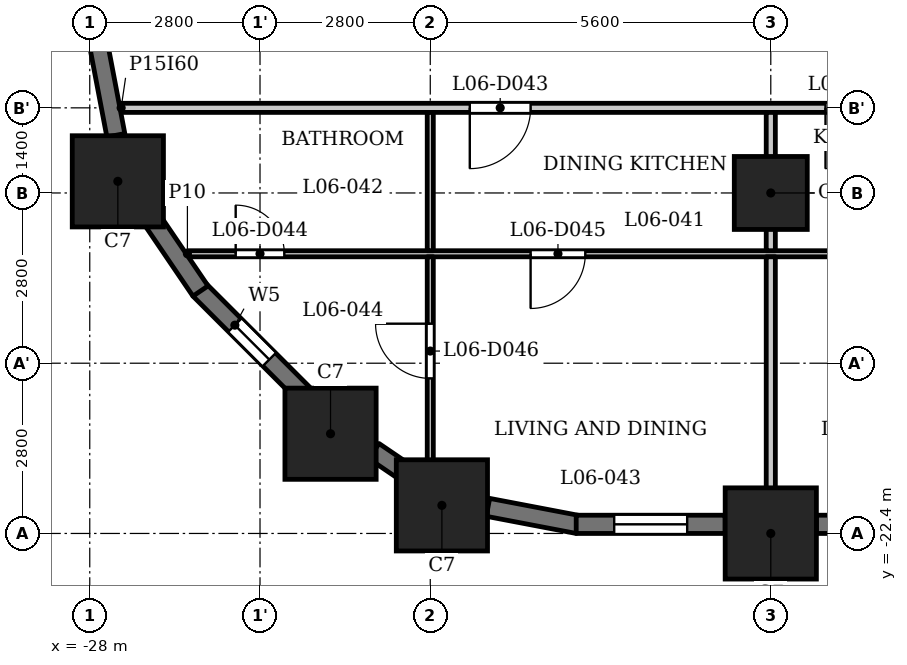
"""IFC4 building model, lengths in metres.
Left out: names, types, materials, properties, quantities, classifications, styles, units other than length and angle.
Written with IfcOpenShell. Run it as: python <this file> out.ifc"""

import sys

from ifc_helpers import new_model, si_unit, direction, frame, frame_2d, origin, origin_2d, place, context, subcontext, project, spatial, rectangle, extrude, element, fill, save


model = new_model("IFC4")
c1 = context("Model", 3, precision=1e-05, world=origin(), true_north=direction((0.0, 1.0)))
c2 = subcontext(c1, "Body", "Model", "MODEL_VIEW")
j1 = project(units=[si_unit("LENGTHUNIT", "METRE"), si_unit("PLANEANGLEUNIT", "RADIAN")], contexts=[c1])
p1 = place(None, origin())
s1 = spatial("IfcSite", under=j1, at=p1, CompositionType="ELEMENT")
p2 = place(p1, origin())
s2 = spatial("IfcBuilding", under=s1, at=p2, CompositionType="ELEMENT")
p3 = place(p2, frame((0.0, 0.0, 30.5)))
s3 = spatial("IfcBuildingStorey", under=s2, at=p3, CompositionType="ELEMENT", Elevation=30.5)
for number, where, z_axis, x_axis in (
    (1, (-22.209, -21.938, 0.0), (0.0, 0.0, 1.0), (1.0, 0.0, 0.0)),
    (2, (-16.8, -22.4, 0.0), (0.0, 0.0, 1.0), (1.0, 0.0, 0.0)),
    (3, (-27.538, -16.609, 0.0), (0.0, 0.0, 1.0), (1.0, 0.0, 0.0)),
    (4, (-24.04, -20.76, 0.0), (0.0, 0.0, 1.0), (1.0, 0.0, 0.0)),
):
    element("IfcColumn", number, at=place(p3, frame(where, z_axis=z_axis, x_axis=x_axis)), inside=s3, PredefinedType="COLUMN", context=c2, shape_type="SweptSolid", body=[
        extrude(rectangle(XDim=1.5, YDim=1.5, at=origin_2d()), origin(), (0.0, 0.0, 1.0), 3.5),
    ])
p4 = place(p3, frame((-16.8, -16.8, 0.0), z_axis=(0.0, 0.0, 1.0), x_axis=(1.0, 0.0, 0.0)))
e5 = element("IfcColumn", 5, at=p4, inside=s3, PredefinedType="COLUMN", context=c2, shape_type="SweptSolid", body=[
    extrude(rectangle(XDim=1.2, YDim=1.2, at=origin_2d()), origin(), (0.0, 0.0, 1.0), 3.5),
])
p5 = place(p3, frame((-26.197, -18.391, 0.0), z_axis=(0.0, 0.0, 1.0), x_axis=(0.707106781187, -0.707106781187, 0.0)))
e6 = element("IfcWall", 6, at=p5, inside=s3, PredefinedType="SOLIDWALL", context=c2, shape_type="SweptSolid", body=[
    extrude(rectangle(XDim=2.45, YDim=0.3, at=frame_2d((1.225, 0.0))), origin(), (0.0, 0.0, 1.0), 2.35),
])
p6 = place(p5, frame((0.825, 0.0, 0.6)))
e7 = element("IfcOpeningElement", 7, at=p6, cuts=e6, PredefinedType="OPENING", context=c2, shape_type="SweptSolid", body=[
    extrude(rectangle(XDim=0.8, YDim=1.55, at=frame_2d((0.4, 0.775))), frame((0.0, 0.16, 0.0), z_axis=(0.0, -1.0, 0.0), x_axis=(1.0, 0.0, 0.0)), (0.0, 0.0, 1.0), 0.32),
])
p7 = place(p3, frame((-23.327, -21.045, 0.0), z_axis=(0.0, 0.0, 1.0), x_axis=(0.827080706709, -0.562083182981, 0.0)))
e8 = element("IfcWall", 8, at=p7, inside=s3, PredefinedType="SOLIDWALL", context=c2, shape_type="SweptSolid", body=[
    extrude(rectangle(XDim=0.677, YDim=0.3, at=frame_2d((0.339, 0.0))), origin(), (0.0, 0.0, 1.0), 3.2),
])
p8 = place(p3, frame((-21.451, -21.97, 0.0), z_axis=(0.0, 0.0, 1.0), x_axis=(0.982287454367, -0.187380247071, 0.0)))
e9 = element("IfcWall", 9, at=p8, inside=s3, PredefinedType="SOLIDWALL", context=c2, shape_type="SweptSolid", body=[
    extrude(rectangle(XDim=1.506, YDim=0.3, at=frame_2d((0.753, 0.0))), origin(), (0.0, 0.0, 1.0), 2.35),
])
p9 = place(p3, frame((-20.0, -22.25, 0.0), z_axis=(0.0, 0.0, 1.0), x_axis=(1.0, 0.0, 0.0)))
e10 = element("IfcWall", 10, at=p9, inside=s3, PredefinedType="SOLIDWALL", context=c2, shape_type="SweptSolid", body=[
    extrude(rectangle(XDim=2.45, YDim=0.3, at=frame_2d((1.225, 0.0))), origin(), (0.0, 0.0, 1.0), 2.35),
])
p10 = place(p9, frame((0.625, 0.0, 0.6)))
e11 = element("IfcOpeningElement", 11, at=p10, cuts=e10, PredefinedType="OPENING", context=c2, shape_type="SweptSolid", body=[
    extrude(rectangle(XDim=1.2, YDim=1.55, at=frame_2d((0.6, 0.775))), frame((0.0, 0.16, 0.0), z_axis=(0.0, -1.0, 0.0), x_axis=(1.0, 0.0, 0.0)), (0.0, 0.0, 1.0), 0.32),
])
p11 = place(p3, frame((-16.05, -22.25, 0.0), z_axis=(0.0, 0.0, 1.0), x_axis=(1.0, 0.0, 0.0)))
e12 = element("IfcWall", 12, at=p11, inside=s3, PredefinedType="SOLIDWALL", context=c2, shape_type="SweptSolid", body=[
    extrude(rectangle(XDim=4.1, YDim=0.3, at=frame_2d((2.05, 0.0))), origin(), (0.0, 0.0, 1.0), 2.35),
])
p12 = place(p11, frame((0.25, 0.0, 1.2)))
e13 = element("IfcOpeningElement", 13, at=p12, cuts=e12, PredefinedType="OPENING", context=c2, shape_type="SweptSolid", body=[
    extrude(rectangle(XDim=3.6, YDim=0.95, at=frame_2d((1.8, 0.475))), frame((0.0, 0.16, 0.0), z_axis=(0.0, -1.0, 0.0), x_axis=(1.0, 0.0, 0.0)), (0.0, 0.0, 1.0), 0.32),
])
for number, where, z_axis, x_axis in (
    (14, (-27.853, -14.372, 0.0), (0.0, 0.0, 1.0), (0.187, -0.982, 0.0)),
    (15, (-27.025, -17.167, 0.0), (0.0, 0.0, 1.0), (0.562, -0.827, 0.0)),
):
    element("IfcWall", number, at=place(p3, frame(where, z_axis=z_axis, x_axis=x_axis)), inside=s3, PredefinedType="SOLIDWALL", context=c2, shape_type="SweptSolid", body=[
        extrude(rectangle(XDim=1.506, YDim=0.3, at=frame_2d((0.753, 0.0))), origin(), (0.0, 0.0, 1.0), 2.35),
    ])
p13 = place(p3, frame((-26.394, -17.8, 0.0), z_axis=(0.0, 0.0, 1.0), x_axis=(1.0, 0.0, 0.0)))
e16 = element("IfcWall", 16, at=p13, inside=s3, PredefinedType="PARTITIONING", context=c2, shape_type="SweptSolid", body=[
    extrude(rectangle(XDim=53.126, YDim=0.1, at=frame_2d((26.563, 0.0))), origin(), (0.0, 0.0, 1.0), 3.2),
])
p14 = place(p13, frame((0.794, 0.0, 0.0)))
e17 = element("IfcOpeningElement", 17, at=p14, cuts=e16, PredefinedType="OPENING", context=c2, shape_type="SweptSolid", body=[
    extrude(rectangle(XDim=0.8, YDim=2.1, at=frame_2d((0.4, 1.05))), frame((0.0, 0.06, 0.0), z_axis=(0.0, -1.0, 0.0), x_axis=(1.0, 0.0, 0.0)), (0.0, 0.0, 1.0), 0.12),
])
p15 = place(p13, frame((5.644, 0.0, 0.0)))
e18 = element("IfcOpeningElement", 18, at=p15, cuts=e16, PredefinedType="OPENING", context=c2, shape_type="SweptSolid", body=[
    extrude(rectangle(XDim=0.9, YDim=2.1, at=frame_2d((0.45, 1.05))), frame((0.0, 0.06, 0.0), z_axis=(0.0, -1.0, 0.0), x_axis=(1.0, 0.0, 0.0)), (0.0, 0.0, 1.0), 0.12),
])
p16 = place(p13, frame((13.244, 0.0, 0.0)))
e19 = element("IfcOpeningElement", 19, at=p16, cuts=e16, PredefinedType="OPENING", context=c2, shape_type="SweptSolid", body=[
    extrude(rectangle(XDim=0.8, YDim=2.1, at=frame_2d((0.4, 1.05))), frame((0.0, 0.06, 0.0), z_axis=(0.0, -1.0, 0.0), x_axis=(1.0, 0.0, 0.0)), (0.0, 0.0, 1.0), 0.12),
])
p17 = place(p13, frame((11.494, 0.0, 0.0)))
e20 = element("IfcOpeningElement", 20, at=p17, cuts=e16, PredefinedType="OPENING", context=c2, shape_type="SweptSolid", body=[
    extrude(rectangle(XDim=0.9, YDim=2.1, at=frame_2d((0.45, 1.05))), frame((0.0, 0.06, 0.0), z_axis=(0.0, -1.0, 0.0), x_axis=(1.0, 0.0, 0.0)), (0.0, 0.0, 1.0), 0.12),
])
p18 = place(p13, frame((19.344, 0.0, 0.0)))
e21 = element("IfcOpeningElement", 21, at=p18, cuts=e16, PredefinedType="OPENING", context=c2, shape_type="SweptSolid", body=[
    extrude(rectangle(XDim=0.8, YDim=2.1, at=frame_2d((0.4, 1.05))), frame((0.0, 0.06, 0.0), z_axis=(0.0, -1.0, 0.0), x_axis=(1.0, 0.0, 0.0)), (0.0, 0.0, 1.0), 0.12),
])
p19 = place(p13, frame((16.094, 0.0, 0.0)))
e22 = element("IfcOpeningElement", 22, at=p19, cuts=e16, PredefinedType="OPENING", context=c2, shape_type="SweptSolid", body=[
    extrude(rectangle(XDim=0.9, YDim=2.1, at=frame_2d((0.45, 1.05))), frame((0.0, 0.06, 0.0), z_axis=(0.0, -1.0, 0.0), x_axis=(1.0, 0.0, 0.0)), (0.0, 0.0, 1.0), 0.12),
])
p20 = place(p13, frame((24.944, 0.0, 0.0)))
e23 = element("IfcOpeningElement", 23, at=p20, cuts=e16, PredefinedType="OPENING", context=c2, shape_type="SweptSolid", body=[
    extrude(rectangle(XDim=0.8, YDim=2.1, at=frame_2d((0.4, 1.05))), frame((0.0, 0.06, 0.0), z_axis=(0.0, -1.0, 0.0), x_axis=(1.0, 0.0, 0.0)), (0.0, 0.0, 1.0), 0.12),
])
p21 = place(p13, frame((22.444, 0.0, 0.0)))
e24 = element("IfcOpeningElement", 24, at=p21, cuts=e16, PredefinedType="OPENING", context=c2, shape_type="SweptSolid", body=[
    extrude(rectangle(XDim=0.9, YDim=2.1, at=frame_2d((0.45, 1.05))), frame((0.0, 0.06, 0.0), z_axis=(0.0, -1.0, 0.0), x_axis=(1.0, 0.0, 0.0)), (0.0, 0.0, 1.0), 0.12),
])
p22 = place(p13, frame((30.294, 0.0, 0.0)))
e25 = element("IfcOpeningElement", 25, at=p22, cuts=e16, PredefinedType="OPENING", context=c2, shape_type="SweptSolid", body=[
    extrude(rectangle(XDim=0.8, YDim=2.1, at=frame_2d((0.4, 1.05))), frame((0.0, 0.06, 0.0), z_axis=(0.0, -1.0, 0.0), x_axis=(1.0, 0.0, 0.0)), (0.0, 0.0, 1.0), 0.12),
])
p23 = place(p13, frame((26.794, 0.0, 0.0)))
e26 = element("IfcOpeningElement", 26, at=p23, cuts=e16, PredefinedType="OPENING", context=c2, shape_type="SweptSolid", body=[
    extrude(rectangle(XDim=0.9, YDim=2.1, at=frame_2d((0.45, 1.05))), frame((0.0, 0.06, 0.0), z_axis=(0.0, -1.0, 0.0), x_axis=(1.0, 0.0, 0.0)), (0.0, 0.0, 1.0), 0.12),
])
p24 = place(p13, frame((32.744, 0.0, 0.0)))
e27 = element("IfcOpeningElement", 27, at=p24, cuts=e16, PredefinedType="OPENING", context=c2, shape_type="SweptSolid", body=[
    extrude(rectangle(XDim=0.8, YDim=2.1, at=frame_2d((0.4, 1.05))), frame((0.0, 0.06, 0.0), z_axis=(0.0, -1.0, 0.0), x_axis=(1.0, 0.0, 0.0)), (0.0, 0.0, 1.0), 0.12),
])
p25 = place(p13, frame((35.594, 0.0, 0.0)))
e28 = element("IfcOpeningElement", 28, at=p25, cuts=e16, PredefinedType="OPENING", context=c2, shape_type="SweptSolid", body=[
    extrude(rectangle(XDim=0.9, YDim=2.1, at=frame_2d((0.45, 1.05))), frame((0.0, 0.06, 0.0), z_axis=(0.0, -1.0, 0.0), x_axis=(1.0, 0.0, 0.0)), (0.0, 0.0, 1.0), 0.12),
])
p26 = place(p13, frame((39.244, 0.0, 0.0)))
e29 = element("IfcOpeningElement", 29, at=p26, cuts=e16, PredefinedType="OPENING", context=c2, shape_type="SweptSolid", body=[
    extrude(rectangle(XDim=0.9, YDim=2.1, at=frame_2d((0.45, 1.05))), frame((0.0, 0.06, 0.0), z_axis=(0.0, -1.0, 0.0), x_axis=(1.0, 0.0, 0.0)), (0.0, 0.0, 1.0), 0.12),
])
p27 = place(p13, frame((41.544, 0.0, 0.0)))
e30 = element("IfcOpeningElement", 30, at=p27, cuts=e16, PredefinedType="OPENING", context=c2, shape_type="SweptSolid", body=[
    extrude(rectangle(XDim=0.9, YDim=2.1, at=frame_2d((0.45, 1.05))), frame((0.0, 0.06, 0.0), z_axis=(0.0, -1.0, 0.0), x_axis=(1.0, 0.0, 0.0)), (0.0, 0.0, 1.0), 0.12),
])
p28 = place(p13, frame((49.362, 0.0, 0.0)))
e31 = element("IfcOpeningElement", 31, at=p28, cuts=e16, PredefinedType="OPENING", context=c2, shape_type="SweptSolid", body=[
    extrude(rectangle(XDim=0.8, YDim=2.1, at=frame_2d((0.4, 1.05))), frame((0.0, 0.06, 0.0), z_axis=(0.0, -1.0, 0.0), x_axis=(1.0, 0.0, 0.0)), (0.0, 0.0, 1.0), 0.12),
])
p29 = place(p13, frame((45.094, 0.0, 0.0)))
e32 = element("IfcOpeningElement", 32, at=p29, cuts=e16, PredefinedType="OPENING", context=c2, shape_type="SweptSolid", body=[
    extrude(rectangle(XDim=0.9, YDim=2.1, at=frame_2d((0.45, 1.05))), frame((0.0, 0.06, 0.0), z_axis=(0.0, -1.0, 0.0), x_axis=(1.0, 0.0, 0.0)), (0.0, 0.0, 1.0), 0.12),
])
p30 = place(p3, frame((-27.484, -15.4, 0.0), z_axis=(0.0, 0.0, 1.0), x_axis=(1.0, 0.0, 0.0)))
e33 = element("IfcWall", 33, at=p30, inside=s3, PredefinedType="PARTITIONING", context=c2, shape_type="SweptSolid", body=[
    extrude(rectangle(XDim=54.968, YDim=0.15, at=frame_2d((27.484, 0.0))), origin(), (0.0, 0.0, 1.0), 3.2),
])
p31 = place(p30, frame((5.734, 0.0, 0.0)))
e34 = element("IfcOpeningElement", 34, at=p31, cuts=e33, PredefinedType="OPENING", context=c2, shape_type="SweptSolid", body=[
    extrude(rectangle(XDim=1.0, YDim=2.1, at=frame_2d((0.5, 1.05))), frame((0.0, 0.085, 0.0), z_axis=(0.0, -1.0, 0.0), x_axis=(1.0, 0.0, 0.0)), (0.0, 0.0, 1.0), 0.17),
])
p32 = place(p30, frame((11.584, 0.0, 0.0)))
e35 = element("IfcOpeningElement", 35, at=p32, cuts=e33, PredefinedType="OPENING", context=c2, shape_type="SweptSolid", body=[
    extrude(rectangle(XDim=1.0, YDim=2.1, at=frame_2d((0.5, 1.05))), frame((0.0, 0.085, 0.0), z_axis=(0.0, -1.0, 0.0), x_axis=(1.0, 0.0, 0.0)), (0.0, 0.0, 1.0), 0.17),
])
p33 = place(p30, frame((17.184, 0.0, 0.0)))
e36 = element("IfcOpeningElement", 36, at=p33, cuts=e33, PredefinedType="OPENING", context=c2, shape_type="SweptSolid", body=[
    extrude(rectangle(XDim=1.0, YDim=2.1, at=frame_2d((0.5, 1.05))), frame((0.0, 0.085, 0.0), z_axis=(0.0, -1.0, 0.0), x_axis=(1.0, 0.0, 0.0)), (0.0, 0.0, 1.0), 0.17),
])
p34 = place(p30, frame((22.534, 0.0, 0.0)))
e37 = element("IfcOpeningElement", 37, at=p34, cuts=e33, PredefinedType="OPENING", context=c2, shape_type="SweptSolid", body=[
    extrude(rectangle(XDim=1.0, YDim=2.1, at=frame_2d((0.5, 1.05))), frame((0.0, 0.085, 0.0), z_axis=(0.0, -1.0, 0.0), x_axis=(1.0, 0.0, 0.0)), (0.0, 0.0, 1.0), 0.17),
])
p35 = place(p30, frame((28.884, 0.0, 0.0)))
e38 = element("IfcOpeningElement", 38, at=p35, cuts=e33, PredefinedType="OPENING", context=c2, shape_type="SweptSolid", body=[
    extrude(rectangle(XDim=1.0, YDim=2.1, at=frame_2d((0.5, 1.05))), frame((0.0, 0.085, 0.0), z_axis=(0.0, -1.0, 0.0), x_axis=(1.0, 0.0, 0.0)), (0.0, 0.0, 1.0), 0.17),
])
p36 = place(p30, frame((39.334, 0.0, 0.0)))
e39 = element("IfcOpeningElement", 39, at=p36, cuts=e33, PredefinedType="OPENING", context=c2, shape_type="SweptSolid", body=[
    extrude(rectangle(XDim=1.0, YDim=2.1, at=frame_2d((0.5, 1.05))), frame((0.0, 0.085, 0.0), z_axis=(0.0, -1.0, 0.0), x_axis=(1.0, 0.0, 0.0)), (0.0, 0.0, 1.0), 0.17),
])
p37 = place(p30, frame((45.184, 0.0, 0.0)))
e40 = element("IfcOpeningElement", 40, at=p37, cuts=e33, PredefinedType="OPENING", context=c2, shape_type="SweptSolid", body=[
    extrude(rectangle(XDim=1.0, YDim=2.1, at=frame_2d((0.5, 1.05))), frame((0.0, 0.085, 0.0), z_axis=(0.0, -1.0, 0.0), x_axis=(1.0, 0.0, 0.0)), (0.0, 0.0, 1.0), 0.17),
])
p38 = place(p3, frame((-22.4, -21.72, 0.0), z_axis=(0.0, 0.0, 1.0), x_axis=(0.0, 1.0, 0.0)))
e41 = element("IfcWall", 41, at=p38, inside=s3, PredefinedType="PARTITIONING", context=c2, shape_type="SweptSolid", body=[
    extrude(rectangle(XDim=3.87, YDim=0.1, at=frame_2d((1.935, 0.0))), origin(), (0.0, 0.0, 1.0), 3.2),
])
p39 = place(p38, frame((1.87, 0.0, 0.0)))
e42 = element("IfcOpeningElement", 42, at=p39, cuts=e41, PredefinedType="OPENING", context=c2, shape_type="SweptSolid", body=[
    extrude(rectangle(XDim=0.9, YDim=2.1, at=frame_2d((0.45, 1.05))), frame((0.0, 0.06, 0.0), z_axis=(0.0, -1.0, 0.0), x_axis=(1.0, 0.0, 0.0)), (0.0, 0.0, 1.0), 0.12),
])
p40 = place(p3, frame((-22.4, -17.75, 0.0), z_axis=(0.0, 0.0, 1.0), x_axis=(0.0, 1.0, 0.0)))
e43 = element("IfcWall", 43, at=p40, inside=s3, PredefinedType="PARTITIONING", context=c2, shape_type="SweptSolid", body=[
    extrude(rectangle(XDim=2.275, YDim=0.1, at=frame_2d((1.137, 0.0))), origin(), (0.0, 0.0, 1.0), 3.2),
])
p41 = place(p3, frame((-16.8, -23.13, 0.0), z_axis=(0.0, 0.0, 1.0), x_axis=(0.0, 1.0, 0.0)))
e44 = element("IfcWall", 44, at=p41, inside=s3, PredefinedType="PARTITIONING", context=c2, shape_type="SweptSolid", body=[
    extrude(rectangle(XDim=5.28, YDim=0.15, at=frame_2d((2.64, 0.0))), origin(), (0.0, 0.0, 1.0), 3.2),
])
p42 = place(p3, frame((-16.8, -17.75, 0.0), z_axis=(0.0, 0.0, 1.0), x_axis=(0.0, 1.0, 0.0)))
e45 = element("IfcWall", 45, at=p42, inside=s3, PredefinedType="PARTITIONING", context=c2, shape_type="SweptSolid", body=[
    extrude(rectangle(XDim=2.275, YDim=0.15, at=frame_2d((1.137, 0.0))), origin(), (0.0, 0.0, 1.0), 3.2),
])
p43 = place(p31, origin())
e46 = element("IfcDoor", 46, at=p43, inside=s3, OperationType="SINGLE_SWING_LEFT", PredefinedType="DOOR", context=c2, shape_type="SweptSolid", body=[
    extrude(rectangle(XDim=1.0, YDim=2.1, at=frame_2d((0.5, 1.05))), frame((0.0, 0.025, 0.0), z_axis=(0.0, -1.0, 0.0), x_axis=(1.0, 0.0, 0.0)), (0.0, 0.0, 1.0), 0.05),
])
fill(e34, e46)
p44 = place(p14, origin())
e47 = element("IfcDoor", 47, at=p44, inside=s3, OperationType="SINGLE_SWING_RIGHT", PredefinedType="DOOR", context=c2, shape_type="SweptSolid", body=[
    extrude(rectangle(XDim=0.8, YDim=2.1, at=frame_2d((0.4, 1.05))), frame((0.0, 0.025, 0.0), z_axis=(0.0, -1.0, 0.0), x_axis=(1.0, 0.0, 0.0)), (0.0, 0.0, 1.0), 0.05),
])
fill(e17, e47)
p45 = place(p15, origin())
e48 = element("IfcDoor", 48, at=p45, inside=s3, OperationType="SINGLE_SWING_LEFT", PredefinedType="DOOR", context=c2, shape_type="SweptSolid", body=[
    extrude(rectangle(XDim=0.9, YDim=2.1, at=frame_2d((0.45, 1.05))), frame((0.0, 0.025, 0.0), z_axis=(0.0, -1.0, 0.0), x_axis=(1.0, 0.0, 0.0)), (0.0, 0.0, 1.0), 0.05),
])
fill(e18, e48)
p46 = place(p39, origin())
e49 = element("IfcDoor", 49, at=p46, inside=s3, OperationType="SINGLE_SWING_LEFT", PredefinedType="DOOR", context=c2, shape_type="SweptSolid", body=[
    extrude(rectangle(XDim=0.9, YDim=2.1, at=frame_2d((0.45, 1.05))), frame((0.0, 0.025, 0.0), z_axis=(0.0, -1.0, 0.0), x_axis=(1.0, 0.0, 0.0)), (0.0, 0.0, 1.0), 0.05),
])
fill(e42, e49)
p47 = place(p32, origin())
e50 = element("IfcDoor", 50, at=p47, inside=s3, OperationType="SINGLE_SWING_LEFT", PredefinedType="DOOR", context=c2, shape_type="SweptSolid", body=[
    extrude(rectangle(XDim=1.0, YDim=2.1, at=frame_2d((0.5, 1.05))), frame((0.0, 0.025, 0.0), z_axis=(0.0, -1.0, 0.0), x_axis=(1.0, 0.0, 0.0)), (0.0, 0.0, 1.0), 0.05),
])
fill(e35, e50)
p48 = place(p6, origin())
e51 = element("IfcWindow", 51, at=p48, inside=s3, PartitioningType="SINGLE_PANEL", PredefinedType="WINDOW", context=c2, shape_type="SweptSolid", body=[
    extrude(rectangle(XDim=0.8, YDim=1.55, at=frame_2d((0.4, 0.775))), frame((0.0, 0.03, 0.0), z_axis=(0.0, -1.0, 0.0), x_axis=(1.0, 0.0, 0.0)), (0.0, 0.0, 1.0), 0.06),
])
fill(e7, e51)
p49 = place(p10, origin())
e52 = element("IfcWindow", 52, at=p49, inside=s3, PartitioningType="SINGLE_PANEL", PredefinedType="WINDOW", context=c2, shape_type="SweptSolid", body=[
    extrude(rectangle(XDim=1.2, YDim=1.55, at=frame_2d((0.6, 0.775))), frame((0.0, 0.03, 0.0), z_axis=(0.0, -1.0, 0.0), x_axis=(1.0, 0.0, 0.0)), (0.0, 0.0, 1.0), 0.06),
])
fill(e11, e52)
save(model, sys.argv[1])
